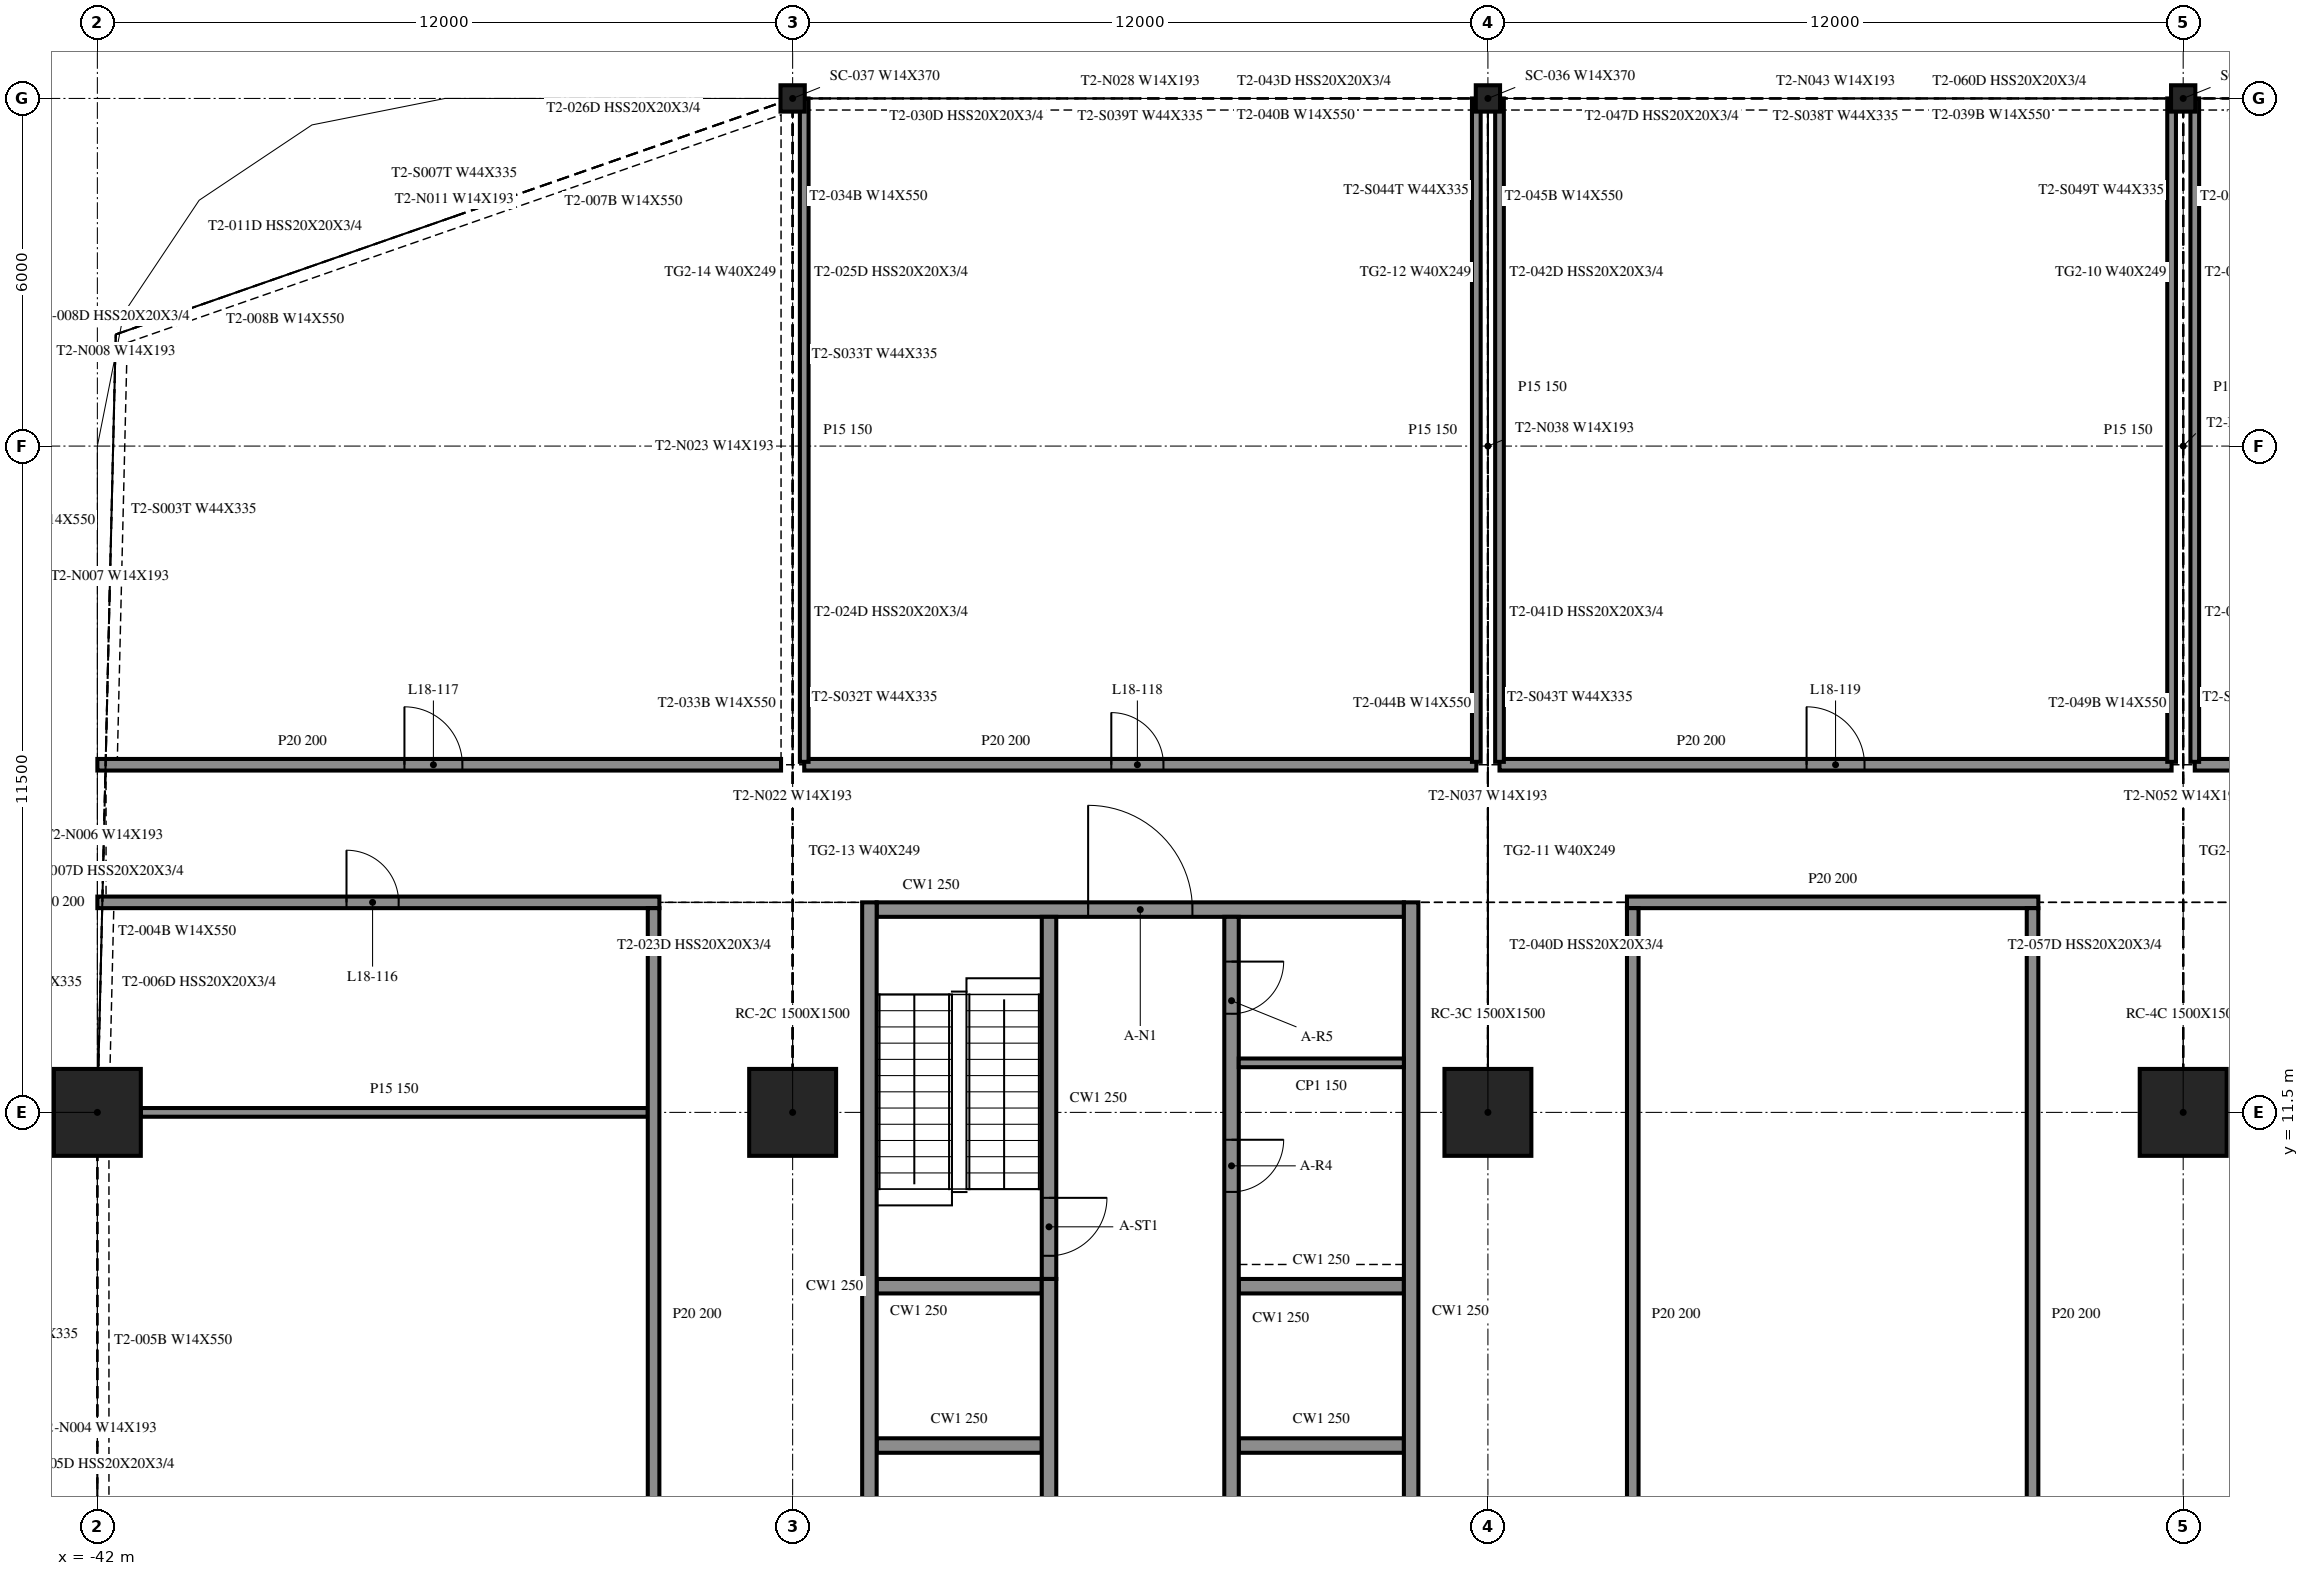
"""IFC4 building model, lengths in metres.
Left out: names, types, materials, properties, quantities, classifications, styles, units other than length and angle.
Written with IfcOpenShell. Run it as: python <this file> out.ifc"""

import sys

from ifc_helpers import new_model, si_unit, direction, frame, frame_2d, origin, origin_2d, place, context, subcontext, project, spatial, rectangle, i_section, extrude, element, fill, save


model = new_model("IFC4")
c1 = context("Model", 3, precision=1e-05, world=origin(), true_north=direction((0.0, 1.0)))
c2 = subcontext(c1, "Body", "Model", "MODEL_VIEW")
j1 = project(units=[si_unit("LENGTHUNIT", "METRE"), si_unit("PLANEANGLEUNIT", "RADIAN")], contexts=[c1])
p1 = place(None, origin())
s1 = spatial("IfcSite", under=j1, at=p1, CompositionType="ELEMENT")
p2 = place(p1, origin())
s2 = spatial("IfcBuilding", under=s1, at=p2, CompositionType="ELEMENT")
p3 = place(p2, frame((0.0, 0.0, 80.4)))
s3 = spatial("IfcBuildingStorey", under=s2, at=p3, CompositionType="ELEMENT", Elevation=80.4)
for number, where, z_axis, x_axis in (
    (1, (-42.0, 11.5, -0.55), (0.0, 0.0, 1.0), (1.0, 0.0, 0.0)),
    (2, (-30.0, 11.5, -0.55), (0.0, 0.0, 1.0), (1.0, 0.0, 0.0)),
    (3, (-18.0, 11.5, -0.55), (0.0, 0.0, 1.0), (1.0, 0.0, 0.0)),
    (4, (-6.0, 11.5, -0.55), (0.0, 0.0, 1.0), (1.0, 0.0, 0.0)),
):
    element("IfcColumn", number, at=place(p3, frame(where, z_axis=z_axis, x_axis=x_axis)), inside=s3, PredefinedType="COLUMN", context=c2, shape_type="SweptSolid", body=[
        extrude(rectangle(XDim=1.5, YDim=1.5, at=origin_2d()), origin(), (0.0, 0.0, 1.0), 4.61),
    ])
for number, where, z_axis, x_axis in (
    (5, (-6.0, 29.0, -0.55), (0.0, 0.0, 1.0), (1.0, 0.0, 0.0)),
    (6, (-18.0, 29.0, -0.55), (0.0, 0.0, 1.0), (1.0, 0.0, 0.0)),
    (7, (-30.0, 29.0, -0.55), (0.0, 0.0, 1.0), (1.0, 0.0, 0.0)),
):
    element("IfcColumn", number, at=place(p3, frame(where, z_axis=z_axis, x_axis=x_axis)), inside=s3, PredefinedType="COLUMN", context=c2, shape_type="SweptSolid", body=[
        extrude(i_section(OverallWidth=0.419, OverallDepth=0.455, WebThickness=0.042, FlangeThickness=0.068, at=origin_2d()), origin(), (0.0, 0.0, 1.0), 4.61),
    ])
for number, where, z_axis, x_axis in (
    (8, (-28.675, 15.125, 0.0), (0.0, 0.0, 1.0), (0.0, -1.0, 0.0)),
    (9, (-19.325, -9.125, 0.0), (0.0, 0.0, 1.0), (0.0, 1.0, 0.0)),
):
    element("IfcWall", number, at=place(p3, frame(where, z_axis=z_axis, x_axis=x_axis)), inside=s3, PredefinedType="SOLIDWALL", context=c2, shape_type="SweptSolid", body=[
        extrude(rectangle(XDim=24.25, YDim=0.25, at=frame_2d((12.125, 0.0))), origin(), (0.0, 0.0, 1.0), 4.06),
    ])
p4 = place(p3, frame((-28.55, 15.0, 0.0), z_axis=(0.0, 0.0, 1.0), x_axis=(1.0, 0.0, 0.0)))
e10 = element("IfcWall", 10, at=p4, inside=s3, PredefinedType="SOLIDWALL", context=c2, shape_type="SweptSolid", body=[
    extrude(rectangle(XDim=9.1, YDim=0.25, at=frame_2d((4.55, 0.0))), origin(), (0.0, 0.0, 1.0), 4.06),
])
p5 = place(p4, frame((3.65, 0.0, 0.0)))
e11 = element("IfcOpeningElement", 11, at=p5, cuts=e10, PredefinedType="OPENING", context=c2, shape_type="SweptSolid", body=[
    extrude(rectangle(XDim=1.8, YDim=2.1, at=frame_2d((0.9, 1.05))), frame((0.0, 0.135, 0.0), z_axis=(0.0, -1.0, 0.0), x_axis=(1.0, 0.0, 0.0)), (0.0, 0.0, 1.0), 0.27),
])
p6 = place(p3, frame((-25.575, -8.875, 0.0), z_axis=(0.0, 0.0, 1.0), x_axis=(0.0, 1.0, 0.0)))
e12 = element("IfcWall", 12, at=p6, inside=s3, PredefinedType="SOLIDWALL", context=c2, shape_type="SweptSolid", body=[
    extrude(rectangle(XDim=17.5, YDim=0.25, at=frame_2d((8.75, 0.0))), origin(), (0.0, 0.0, 1.0), 4.06),
])
p7 = place(p6, frame((1.012, 0.0, 0.0)))
e13 = element("IfcOpeningElement", 13, at=p7, cuts=e12, PredefinedType="OPENING", context=c2, shape_type="SweptSolid", body=[
    extrude(rectangle(XDim=0.9, YDim=2.1, at=frame_2d((0.45, 1.05))), frame((0.0, 0.135, 0.0), z_axis=(0.0, -1.0, 0.0), x_axis=(1.0, 0.0, 0.0)), (0.0, 0.0, 1.0), 0.27),
])
p8 = place(p6, frame((4.087, 0.0, 0.0)))
e14 = element("IfcOpeningElement", 14, at=p8, cuts=e12, PredefinedType="OPENING", context=c2, shape_type="SweptSolid", body=[
    extrude(rectangle(XDim=0.9, YDim=2.1, at=frame_2d((0.45, 1.05))), frame((0.0, 0.135, 0.0), z_axis=(0.0, -1.0, 0.0), x_axis=(1.0, 0.0, 0.0)), (0.0, 0.0, 1.0), 0.27),
])
p9 = place(p3, frame((-25.575, 14.875, 0.0), z_axis=(0.0, 0.0, 1.0), x_axis=(0.0, -1.0, 0.0)))
e15 = element("IfcWall", 15, at=p9, inside=s3, PredefinedType="SOLIDWALL", context=c2, shape_type="SweptSolid", body=[
    extrude(rectangle(XDim=6.25, YDim=0.25, at=frame_2d((3.125, 0.0))), origin(), (0.0, 0.0, 1.0), 4.06),
])
p10 = place(p9, frame((4.85, 0.0, 0.0)))
e16 = element("IfcOpeningElement", 16, at=p10, cuts=e15, PredefinedType="OPENING", context=c2, shape_type="SweptSolid", body=[
    extrude(rectangle(XDim=1.0, YDim=2.1, at=frame_2d((0.5, 1.05))), frame((0.0, 0.135, 0.0), z_axis=(0.0, -1.0, 0.0), x_axis=(1.0, 0.0, 0.0)), (0.0, 0.0, 1.0), 0.27),
])
p11 = place(p3, frame((-22.425, 14.875, 0.0), z_axis=(0.0, 0.0, 1.0), x_axis=(0.0, -1.0, 0.0)))
e17 = element("IfcWall", 17, at=p11, inside=s3, PredefinedType="SOLIDWALL", context=c2, shape_type="SweptSolid", body=[
    extrude(rectangle(XDim=23.75, YDim=0.25, at=frame_2d((11.875, 0.0))), origin(), (0.0, 0.0, 1.0), 4.06),
])
p12 = place(p11, frame((20.3, 0.0, 0.0)))
e18 = element("IfcOpeningElement", 18, at=p12, cuts=e17, PredefinedType="OPENING", context=c2, shape_type="SweptSolid", body=[
    extrude(rectangle(XDim=0.9, YDim=2.1, at=frame_2d((0.45, 1.05))), frame((0.0, 0.135, 0.0), z_axis=(0.0, -1.0, 0.0), x_axis=(1.0, 0.0, 0.0)), (0.0, 0.0, 1.0), 0.27),
])
p13 = place(p11, frame((3.847, 0.0, 0.0)))
e19 = element("IfcOpeningElement", 19, at=p13, cuts=e17, PredefinedType="OPENING", context=c2, shape_type="SweptSolid", body=[
    extrude(rectangle(XDim=0.9, YDim=2.1, at=frame_2d((0.45, 1.05))), frame((0.0, 0.135, 0.0), z_axis=(0.0, -1.0, 0.0), x_axis=(1.0, 0.0, 0.0)), (0.0, 0.0, 1.0), 0.27),
])
p14 = place(p11, frame((0.772, 0.0, 0.0)))
e20 = element("IfcOpeningElement", 20, at=p14, cuts=e17, PredefinedType="OPENING", context=c2, shape_type="SweptSolid", body=[
    extrude(rectangle(XDim=0.9, YDim=2.1, at=frame_2d((0.45, 1.05))), frame((0.0, 0.135, 0.0), z_axis=(0.0, -1.0, 0.0), x_axis=(1.0, 0.0, 0.0)), (0.0, 0.0, 1.0), 0.27),
])
for number, where, z_axis, x_axis in (
    (21, (-28.55, 5.75, 0.0), (0.0, 0.0, 1.0), (1.0, 0.0, 0.0)),
    (22, (-28.55, 8.5, 0.0), (0.0, 0.0, 1.0), (1.0, 0.0, 0.0)),
    (23, (-22.3, 5.75, 0.0), (0.0, 0.0, 1.0), (1.0, 0.0, 0.0)),
    (24, (-22.3, 8.5, 0.0), (0.0, 0.0, 1.0), (1.0, 0.0, 0.0)),
):
    element("IfcWall", number, at=place(p3, frame(where, z_axis=z_axis, x_axis=x_axis)), inside=s3, PredefinedType="SOLIDWALL", context=c2, shape_type="SweptSolid", body=[
        extrude(rectangle(XDim=2.85, YDim=0.25, at=frame_2d((1.425, 0.0))), origin(), (0.0, 0.0, 1.0), 4.06),
    ])
p15 = place(p3, frame((-22.3, 12.355, 0.0), z_axis=(0.0, 0.0, 1.0), x_axis=(1.0, 0.0, 0.0)))
e25 = element("IfcWall", 25, at=p15, inside=s3, PredefinedType="PARTITIONING", context=c2, shape_type="SweptSolid", body=[
    extrude(rectangle(XDim=2.85, YDim=0.15, at=frame_2d((1.425, 0.0))), origin(), (0.0, 0.0, 1.0), 4.06),
])
p16 = place(p3, frame((-41.25, 11.5, 0.0), z_axis=(0.0, 0.0, 1.0), x_axis=(1.0, 0.0, 0.0)))
e26 = element("IfcWall", 26, at=p16, inside=s3, PredefinedType="PARTITIONING", context=c2, shape_type="SweptSolid", body=[
    extrude(rectangle(XDim=8.75, YDim=0.15, at=frame_2d((4.375, 0.0))), origin(), (0.0, 0.0, 1.0), 4.06),
])
p17 = place(p3, frame((-42.0, 15.125, 0.0), z_axis=(0.0, 0.0, 1.0), x_axis=(1.0, 0.0, 0.0)))
e27 = element("IfcWall", 27, at=p17, inside=s3, PredefinedType="PARTITIONING", context=c2, shape_type="SweptSolid", body=[
    extrude(rectangle(XDim=9.7, YDim=0.2, at=frame_2d((4.85, 0.0))), origin(), (0.0, 0.0, 1.0), 4.06),
])
p18 = place(p17, frame((4.3, 0.0, 0.0)))
e28 = element("IfcOpeningElement", 28, at=p18, cuts=e27, PredefinedType="OPENING", context=c2, shape_type="SweptSolid", body=[
    extrude(rectangle(XDim=0.9, YDim=2.1, at=frame_2d((0.45, 1.05))), frame((0.0, 0.11, 0.0), z_axis=(0.0, -1.0, 0.0), x_axis=(1.0, 0.0, 0.0)), (0.0, 0.0, 1.0), 0.22),
])
p19 = place(p3, frame((-15.6, 15.125, 0.0), z_axis=(0.0, 0.0, 1.0), x_axis=(1.0, 0.0, 0.0)))
e29 = element("IfcWall", 29, at=p19, inside=s3, PredefinedType="PARTITIONING", context=c2, shape_type="SweptSolid", body=[
    extrude(rectangle(XDim=7.1, YDim=0.2, at=frame_2d((3.55, 0.0))), origin(), (0.0, 0.0, 1.0), 4.06),
])
p20 = place(p3, frame((-42.0, 17.5, 0.0), z_axis=(0.0, 0.0, 1.0), x_axis=(1.0, 0.0, 0.0)))
e30 = element("IfcWall", 30, at=p20, inside=s3, PredefinedType="PARTITIONING", context=c2, shape_type="SweptSolid", body=[
    extrude(rectangle(XDim=11.8, YDim=0.2, at=frame_2d((5.9, 0.0))), origin(), (0.0, 0.0, 1.0), 4.06),
])
p21 = place(p20, frame((5.3, 0.0, 0.0)))
e31 = element("IfcOpeningElement", 31, at=p21, cuts=e30, PredefinedType="OPENING", context=c2, shape_type="SweptSolid", body=[
    extrude(rectangle(XDim=1.0, YDim=2.1, at=frame_2d((0.5, 1.05))), frame((0.0, 0.11, 0.0), z_axis=(0.0, -1.0, 0.0), x_axis=(1.0, 0.0, 0.0)), (0.0, 0.0, 1.0), 0.22),
])
p22 = place(p3, frame((-29.8, 17.5, 0.0), z_axis=(0.0, 0.0, 1.0), x_axis=(1.0, 0.0, 0.0)))
e32 = element("IfcWall", 32, at=p22, inside=s3, PredefinedType="PARTITIONING", context=c2, shape_type="SweptSolid", body=[
    extrude(rectangle(XDim=11.6, YDim=0.2, at=frame_2d((5.8, 0.0))), origin(), (0.0, 0.0, 1.0), 4.06),
])
p23 = place(p22, frame((5.3, 0.0, 0.0)))
e33 = element("IfcOpeningElement", 33, at=p23, cuts=e32, PredefinedType="OPENING", context=c2, shape_type="SweptSolid", body=[
    extrude(rectangle(XDim=0.9, YDim=2.1, at=frame_2d((0.45, 1.05))), frame((0.0, 0.11, 0.0), z_axis=(0.0, -1.0, 0.0), x_axis=(1.0, 0.0, 0.0)), (0.0, 0.0, 1.0), 0.22),
])
p24 = place(p3, frame((-17.8, 17.5, 0.0), z_axis=(0.0, 0.0, 1.0), x_axis=(1.0, 0.0, 0.0)))
e34 = element("IfcWall", 34, at=p24, inside=s3, PredefinedType="PARTITIONING", context=c2, shape_type="SweptSolid", body=[
    extrude(rectangle(XDim=11.6, YDim=0.2, at=frame_2d((5.8, 0.0))), origin(), (0.0, 0.0, 1.0), 4.06),
])
p25 = place(p24, frame((5.3, 0.0, 0.0)))
e35 = element("IfcOpeningElement", 35, at=p25, cuts=e34, PredefinedType="OPENING", context=c2, shape_type="SweptSolid", body=[
    extrude(rectangle(XDim=1.0, YDim=2.1, at=frame_2d((0.5, 1.05))), frame((0.0, 0.11, 0.0), z_axis=(0.0, -1.0, 0.0), x_axis=(1.0, 0.0, 0.0)), (0.0, 0.0, 1.0), 0.22),
])
p26 = place(p3, frame((-5.8, 17.5, 0.0), z_axis=(0.0, 0.0, 1.0), x_axis=(1.0, 0.0, 0.0)))
e36 = element("IfcWall", 36, at=p26, inside=s3, PredefinedType="PARTITIONING", context=c2, shape_type="SweptSolid", body=[
    extrude(rectangle(XDim=11.6, YDim=0.2, at=frame_2d((5.8, 0.0))), origin(), (0.0, 0.0, 1.0), 4.06),
])
p27 = place(p26, frame((5.3, 0.0, 0.0)))
e37 = element("IfcOpeningElement", 37, at=p27, cuts=e36, PredefinedType="OPENING", context=c2, shape_type="SweptSolid", body=[
    extrude(rectangle(XDim=1.0, YDim=2.1, at=frame_2d((0.5, 1.05))), frame((0.0, 0.11, 0.0), z_axis=(0.0, -1.0, 0.0), x_axis=(1.0, 0.0, 0.0)), (0.0, 0.0, 1.0), 0.22),
])
p28 = place(p3, frame((-32.4, -9.025, 0.0), z_axis=(0.0, 0.0, 1.0), x_axis=(0.0, 1.0, 0.0)))
e38 = element("IfcWall", 38, at=p28, inside=s3, PredefinedType="PARTITIONING", context=c2, shape_type="SweptSolid", body=[
    extrude(rectangle(XDim=24.05, YDim=0.2, at=frame_2d((12.025, 0.0))), origin(), (0.0, 0.0, 1.0), 4.06),
])
p29 = place(p28, frame((11.5, 0.0, 0.0)))
e39 = element("IfcOpeningElement", 39, at=p29, cuts=e38, PredefinedType="OPENING", context=c2, shape_type="SweptSolid", body=[
    extrude(rectangle(XDim=1.0, YDim=2.1, at=frame_2d((0.5, 1.05))), frame((0.0, 0.11, 0.0), z_axis=(0.0, -1.0, 0.0), x_axis=(1.0, 0.0, 0.0)), (0.0, 0.0, 1.0), 0.22),
])
for number, where, z_axis, x_axis in (
    (40, (-29.8, 17.55, 0.0), (0.0, 0.0, 1.0), (0.0, 1.0, 0.0)),
    (41, (-18.2, 17.55, 0.0), (0.0, 0.0, 1.0), (0.0, 1.0, 0.0)),
    (42, (-17.8, 17.55, 0.0), (0.0, 0.0, 1.0), (0.0, 1.0, 0.0)),
):
    element("IfcWall", number, at=place(p3, frame(where, z_axis=z_axis, x_axis=x_axis)), inside=s3, PredefinedType="PARTITIONING", context=c2, shape_type="SweptSolid", body=[
        extrude(rectangle(XDim=11.45, YDim=0.15, at=frame_2d((5.725, 0.0))), origin(), (0.0, 0.0, 1.0), 4.06),
    ])
for number, where, z_axis, x_axis in (
    (43, (-15.5, -9.025, 0.0), (0.0, 0.0, 1.0), (0.0, 1.0, 0.0)),
    (44, (-8.6, -9.025, 0.0), (0.0, 0.0, 1.0), (0.0, 1.0, 0.0)),
):
    element("IfcWall", number, at=place(p3, frame(where, z_axis=z_axis, x_axis=x_axis)), inside=s3, PredefinedType="PARTITIONING", context=c2, shape_type="SweptSolid", body=[
        extrude(rectangle(XDim=24.05, YDim=0.2, at=frame_2d((12.025, 0.0))), origin(), (0.0, 0.0, 1.0), 4.06),
    ])
for number, where, z_axis, x_axis in (
    (45, (-6.2, 17.55, 0.0), (0.0, 0.0, 1.0), (0.0, 1.0, 0.0)),
    (46, (-5.8, 17.55, 0.0), (0.0, 0.0, 1.0), (0.0, 1.0, 0.0)),
):
    element("IfcWall", number, at=place(p3, frame(where, z_axis=z_axis, x_axis=x_axis)), inside=s3, PredefinedType="PARTITIONING", context=c2, shape_type="SweptSolid", body=[
        extrude(rectangle(XDim=11.45, YDim=0.15, at=frame_2d((5.725, 0.0))), origin(), (0.0, 0.0, 1.0), 4.06),
    ])
p30 = place(p5, origin())
e47 = element("IfcDoor", 47, at=p30, inside=s3, OperationType="DOUBLE_DOOR_SINGLE_SWING", PredefinedType="DOOR", context=c2, shape_type="SweptSolid", body=[
    extrude(rectangle(XDim=1.8, YDim=2.1, at=frame_2d((0.9, 1.05))), frame((0.0, 0.025, 0.0), z_axis=(0.0, -1.0, 0.0), x_axis=(1.0, 0.0, 0.0)), (0.0, 0.0, 1.0), 0.05),
])
fill(e11, e47)
p31 = place(p13, origin())
e48 = element("IfcDoor", 48, at=p31, inside=s3, OperationType="SINGLE_SWING_RIGHT", PredefinedType="DOOR", context=c2, shape_type="SweptSolid", body=[
    extrude(rectangle(XDim=0.9, YDim=2.1, at=frame_2d((0.45, 1.05))), frame((0.0, 0.025, 0.0), z_axis=(0.0, -1.0, 0.0), x_axis=(1.0, 0.0, 0.0)), (0.0, 0.0, 1.0), 0.05),
])
fill(e19, e48)
p32 = place(p14, origin())
e49 = element("IfcDoor", 49, at=p32, inside=s3, OperationType="SINGLE_SWING_LEFT", PredefinedType="DOOR", context=c2, shape_type="SweptSolid", body=[
    extrude(rectangle(XDim=0.9, YDim=2.1, at=frame_2d((0.45, 1.05))), frame((0.0, 0.025, 0.0), z_axis=(0.0, -1.0, 0.0), x_axis=(1.0, 0.0, 0.0)), (0.0, 0.0, 1.0), 0.05),
])
fill(e20, e49)
p33 = place(p10, origin())
e50 = element("IfcDoor", 50, at=p33, inside=s3, OperationType="SINGLE_SWING_RIGHT", PredefinedType="DOOR", context=c2, shape_type="SweptSolid", body=[
    extrude(rectangle(XDim=1.0, YDim=2.1, at=frame_2d((0.5, 1.05))), frame((0.0, 0.025, 0.0), z_axis=(0.0, -1.0, 0.0), x_axis=(1.0, 0.0, 0.0)), (0.0, 0.0, 1.0), 0.05),
])
fill(e16, e50)
p34 = place(p18, origin())
e51 = element("IfcDoor", 51, at=p34, inside=s3, OperationType="SINGLE_SWING_LEFT", PredefinedType="DOOR", context=c2, shape_type="SweptSolid", body=[
    extrude(rectangle(XDim=0.9, YDim=2.1, at=frame_2d((0.45, 1.05))), frame((0.0, 0.025, 0.0), z_axis=(0.0, -1.0, 0.0), x_axis=(1.0, 0.0, 0.0)), (0.0, 0.0, 1.0), 0.05),
])
fill(e28, e51)
p35 = place(p21, origin())
e52 = element("IfcDoor", 52, at=p35, inside=s3, OperationType="SINGLE_SWING_RIGHT", PredefinedType="DOOR", context=c2, shape_type="SweptSolid", body=[
    extrude(rectangle(XDim=1.0, YDim=2.1, at=frame_2d((0.5, 1.05))), frame((0.0, 0.025, 0.0), z_axis=(0.0, -1.0, 0.0), x_axis=(1.0, 0.0, 0.0)), (0.0, 0.0, 1.0), 0.05),
])
fill(e31, e52)
p36 = place(p23, origin())
e53 = element("IfcDoor", 53, at=p36, inside=s3, OperationType="SINGLE_SWING_LEFT", PredefinedType="DOOR", context=c2, shape_type="SweptSolid", body=[
    extrude(rectangle(XDim=0.9, YDim=2.1, at=frame_2d((0.45, 1.05))), frame((0.0, 0.025, 0.0), z_axis=(0.0, -1.0, 0.0), x_axis=(1.0, 0.0, 0.0)), (0.0, 0.0, 1.0), 0.05),
])
fill(e33, e53)
p37 = place(p25, origin())
e54 = element("IfcDoor", 54, at=p37, inside=s3, OperationType="SINGLE_SWING_RIGHT", PredefinedType="DOOR", context=c2, shape_type="SweptSolid", body=[
    extrude(rectangle(XDim=1.0, YDim=2.1, at=frame_2d((0.5, 1.05))), frame((0.0, 0.025, 0.0), z_axis=(0.0, -1.0, 0.0), x_axis=(1.0, 0.0, 0.0)), (0.0, 0.0, 1.0), 0.05),
])
fill(e35, e54)
save(model, sys.argv[1])
